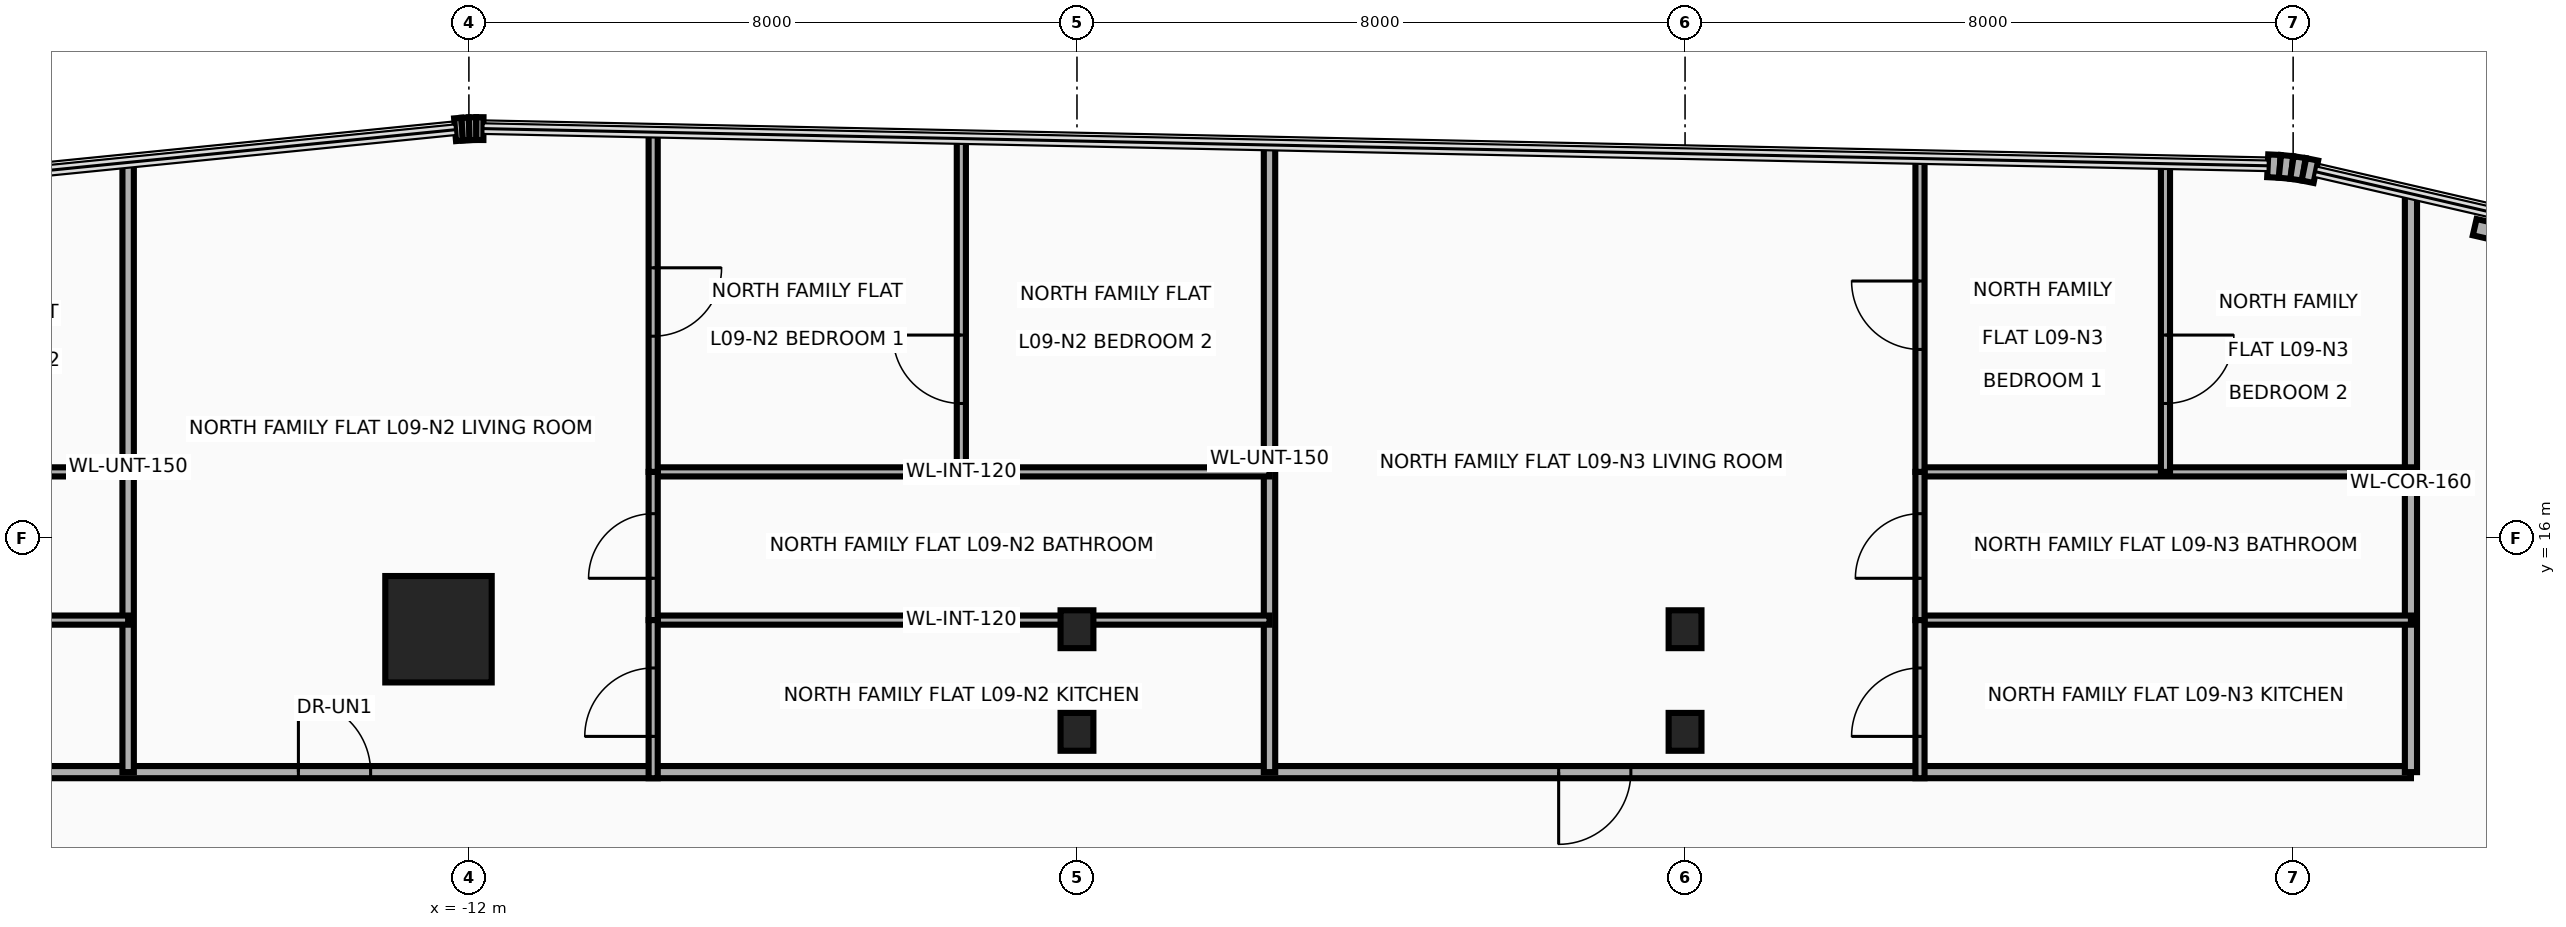
"""IFC4 building model, lengths in metres.
Left out: names, types, materials, properties, quantities, classifications, styles, units other than length and angle.
Written with IfcOpenShell. Run it as: python <this file> out.ifc"""

import sys

from ifc_helpers import new_model, si_unit, direction, frame, frame_2d, origin, origin_2d, place, context, subcontext, project, spatial, rectangle, i_section, extrude, source, transform, mapped, element, fill, save


model = new_model("IFC4")
c1 = context("Model", 3, precision=1e-05, world=origin(), true_north=direction((0.0, 1.0)))
c2 = subcontext(c1, "Body", "Model", "MODEL_VIEW")
j1 = project(units=[si_unit("LENGTHUNIT", "METRE"), si_unit("PLANEANGLEUNIT", "RADIAN")], contexts=[c1])
p1 = place(None, origin())
s1 = spatial("IfcSite", under=j1, at=p1, CompositionType="ELEMENT")
p2 = place(p1, origin())
s2 = spatial("IfcBuilding", under=s1, at=p2, CompositionType="ELEMENT")
p3 = place(p2, frame((0.0, 0.0, 40.8)))
s3 = spatial("IfcBuildingStorey", under=s2, at=p3, CompositionType="ELEMENT", Elevation=40.8)
m1 = source(origin(), c2, "Body", "SweptSolid", [
    extrude(rectangle(XDim=1.4, YDim=1.4, at=origin_2d()), origin(), (0.0, 0.0, 1.0), 3.7),
])
p4 = place(p3, frame((-12.4, 14.8, 0.0), z_axis=(0.0, 0.0, 1.0), x_axis=(1.0, 0.0, 0.0)))
e1 = element("IfcColumn", 1, at=p4, inside=s3, PredefinedType="COLUMN", context=c2, shape_type="MappedRepresentation", body=[
    mapped(m1, transform((0.0, 0.0, 0.0), x_axis=(1.0, 0.0, 0.0), y_axis=(0.0, 1.0, 0.0), z_axis=(0.0, 0.0, 1.0), scale=1.0)),
])
m2 = source(origin(), c2, "Body", "SweptSolid", [
    extrude(i_section(OverallWidth=0.432, OverallDepth=0.498, WebThickness=0.056, FlangeThickness=0.089, at=origin_2d()), origin(), (0.0, 0.0, 1.0), 3.7),
])
for number, where, z_axis, x_axis in (
    (2, (-4.0, 13.45, 0.0), (0.0, 0.0, 1.0), (1.0, 0.0, 0.0)),
    (3, (-4.0, 14.8, 0.0), (0.0, 0.0, 1.0), (1.0, 0.0, 0.0)),
    (4, (4.0, 13.45, 0.0), (0.0, 0.0, 1.0), (1.0, 0.0, 0.0)),
    (5, (4.0, 14.8, 0.0), (0.0, 0.0, 1.0), (1.0, 0.0, 0.0)),
):
    element("IfcColumn", number, at=place(p3, frame(where, z_axis=z_axis, x_axis=x_axis)), inside=s3, PredefinedType="COLUMN", context=c2, shape_type="MappedRepresentation", body=[
        mapped(m2, transform((0.0, 0.0, 0.0), x_axis=(1.0, 0.0, 0.0), y_axis=(0.0, 1.0, 0.0), z_axis=(0.0, 0.0, 1.0), scale=1.0)),
    ])
p5 = place(p3, frame((-12.182, 21.371, 0.0), z_axis=(0.0, 0.0, 1.0), x_axis=(0.996527790842, 0.08326080759, 0.0)))
e6 = element("IfcWall", 6, at=p5, inside=s3, PredefinedType="SOLIDWALL", context=c2, shape_type="SweptSolid", body=[
    extrude(rectangle(XDim=0.094, YDim=0.3, at=frame_2d((0.047, 0.0))), origin(), (0.0, 0.0, 1.0), 3.46),
])
p6 = place(p3, frame((-12.088, 21.379, 0.0), z_axis=(0.0, 0.0, 1.0), x_axis=(0.998476480444, 0.055178963393, 0.0)))
e7 = element("IfcWall", 7, at=p6, inside=s3, PredefinedType="SOLIDWALL", context=c2, shape_type="SweptSolid", body=[
    extrude(rectangle(XDim=0.093, YDim=0.3, at=frame_2d((0.046, 0.0))), origin(), (0.0, 0.0, 1.0), 3.46),
])
p7 = place(p3, frame((-11.996, 21.384, 0.0), z_axis=(0.0, 0.0, 1.0), x_axis=(0.999722573757, 0.023553673204, 0.0)))
e8 = element("IfcWall", 8, at=p7, inside=s3, PredefinedType="SOLIDWALL", context=c2, shape_type="SweptSolid", body=[
    extrude(rectangle(XDim=0.093, YDim=0.3, at=frame_2d((0.047, 0.0))), origin(), (0.0, 0.0, 1.0), 3.46),
])
p8 = place(p3, frame((-11.902, 21.386, 0.0), z_axis=(0.0, 0.0, 1.0), x_axis=(0.999986507273, -0.005194735103, 0.0)))
e9 = element("IfcWall", 9, at=p8, inside=s3, PredefinedType="SOLIDWALL", context=c2, shape_type="SweptSolid", body=[
    extrude(rectangle(XDim=0.094, YDim=0.3, at=frame_2d((0.047, 0.0))), origin(), (0.0, 0.0, 1.0), 3.46),
])
p9 = place(p3, frame((11.666, 20.897, 0.0), z_axis=(0.0, 0.0, 1.0), x_axis=(0.998885297239, -0.047203421059, 0.0)))
e10 = element("IfcWall", 10, at=p9, inside=s3, PredefinedType="SOLIDWALL", context=c2, shape_type="SweptSolid", body=[
    extrude(rectangle(XDim=0.16, YDim=0.3, at=frame_2d((0.08, 0.0))), origin(), (0.0, 0.0, 1.0), 3.46),
])
p10 = place(p3, frame((11.826, 20.889, 0.0), z_axis=(0.0, 0.0, 1.0), x_axis=(0.995172891136, -0.098137234257, 0.0)))
e11 = element("IfcWall", 11, at=p10, inside=s3, PredefinedType="SOLIDWALL", context=c2, shape_type="SweptSolid", body=[
    extrude(rectangle(XDim=0.159, YDim=0.3, at=frame_2d((0.08, 0.0))), origin(), (0.0, 0.0, 1.0), 3.46),
])
p11 = place(p3, frame((11.984, 20.874, 0.0), z_axis=(0.0, 0.0, 1.0), x_axis=(0.988846069207, -0.148941100486, 0.0)))
e12 = element("IfcWall", 12, at=p11, inside=s3, PredefinedType="SOLIDWALL", context=c2, shape_type="SweptSolid", body=[
    extrude(rectangle(XDim=0.159, YDim=0.3, at=frame_2d((0.08, 0.0))), origin(), (0.0, 0.0, 1.0), 3.46),
])
p12 = place(p3, frame((12.142, 20.85, 0.0), z_axis=(0.0, 0.0, 1.0), x_axis=(0.979991950448, -0.19903712482, 0.0)))
e13 = element("IfcWall", 13, at=p12, inside=s3, PredefinedType="SOLIDWALL", context=c2, shape_type="SweptSolid", body=[
    extrude(rectangle(XDim=0.161, YDim=0.3, at=frame_2d((0.08, 0.0))), origin(), (0.0, 0.0, 1.0), 3.46),
])
p13 = place(p3, frame((14.389, 20.09, 0.0), z_axis=(0.0, 0.0, 1.0), x_axis=(0.974400545997, -0.224818984875, 0.0)))
e14 = element("IfcWall", 14, at=p13, inside=s3, PredefinedType="SOLIDWALL", context=c2, shape_type="SweptSolid", body=[
    extrude(rectangle(XDim=2.2, YDim=0.22, at=frame_2d((1.1, 0.0))), origin(), (0.0, 0.0, 1.0), 3.46),
])
p14 = place(p13, frame((0.65, 0.0, 0.95)))
e15 = element("IfcOpeningElement", 15, at=p14, cuts=e14, PredefinedType="OPENING", context=c2, shape_type="SweptSolid", body=[
    extrude(rectangle(XDim=0.9, YDim=1.3, at=frame_2d((0.45, 0.65))), frame((0.0, 0.125, 0.0), z_axis=(0.0, -1.0, 0.0), x_axis=(1.0, 0.0, 0.0)), (0.0, 0.0, 1.0), 0.25),
])
p15 = place(p3, frame((-31.89, 12.92, 0.0), z_axis=(0.0, 0.0, 1.0), x_axis=(1.0, 0.0, 0.0)))
e16 = element("IfcWall", 16, at=p15, inside=s3, PredefinedType="PARTITIONING", context=c2, shape_type="SweptSolid", body=[
    extrude(rectangle(XDim=45.44, YDim=0.16, at=frame_2d((22.72, 0.0))), origin(), (0.0, 0.0, 1.0), 2.583),
])
p16 = place(p15, frame((3.069, 0.0, 0.0)))
e17 = element("IfcOpeningElement", 17, at=p16, cuts=e16, PredefinedType="OPENING", context=c2, shape_type="SweptSolid", body=[
    extrude(rectangle(XDim=0.95, YDim=2.15, at=frame_2d((0.475, 1.075))), frame((0.0, 0.095, 0.0), z_axis=(0.0, -1.0, 0.0), x_axis=(1.0, 0.0, 0.0)), (0.0, 0.0, 1.0), 0.19),
])
p17 = place(p15, frame((17.647, 0.0, 0.0)))
e18 = element("IfcOpeningElement", 18, at=p17, cuts=e16, PredefinedType="OPENING", context=c2, shape_type="SweptSolid", body=[
    extrude(rectangle(XDim=0.95, YDim=2.15, at=frame_2d((0.475, 1.075))), frame((0.0, 0.095, 0.0), z_axis=(0.0, -1.0, 0.0), x_axis=(1.0, 0.0, 0.0)), (0.0, 0.0, 1.0), 0.19),
])
p18 = place(p15, frame((34.227, 0.0, 0.0)))
e19 = element("IfcOpeningElement", 19, at=p18, cuts=e16, PredefinedType="OPENING", context=c2, shape_type="SweptSolid", body=[
    extrude(rectangle(XDim=0.95, YDim=2.15, at=frame_2d((0.475, 1.075))), frame((0.0, 0.095, 0.0), z_axis=(0.0, -1.0, 0.0), x_axis=(1.0, 0.0, 0.0)), (0.0, 0.0, 1.0), 0.19),
])
p19 = place(p3, frame((13.55, 12.92, 0.0), z_axis=(0.0, 0.0, 1.0), x_axis=(0.0, 1.0, 0.0)))
e20 = element("IfcWall", 20, at=p19, inside=s3, PredefinedType="PARTITIONING", context=c2, shape_type="SweptSolid", body=[
    extrude(rectangle(XDim=7.609, YDim=0.16, at=frame_2d((3.805, 0.0))), origin(), (0.0, 0.0, 1.0), 2.583),
])
p20 = place(p3, frame((-16.483, 12.92, 0.0), z_axis=(0.0, 0.0, 1.0), x_axis=(0.0, 1.0, 0.0)))
e21 = element("IfcWall", 21, at=p20, inside=s3, PredefinedType="PARTITIONING", context=c2, shape_type="SweptSolid", body=[
    extrude(rectangle(XDim=8.021, YDim=0.15, at=frame_2d((4.011, 0.0))), origin(), (0.0, 0.0, 1.0), 2.583),
])
p21 = place(p3, frame((-1.467, 12.92, 0.0), z_axis=(0.0, 0.0, 1.0), x_axis=(0.0, 1.0, 0.0)))
e22 = element("IfcWall", 22, at=p21, inside=s3, PredefinedType="PARTITIONING", context=c2, shape_type="SweptSolid", body=[
    extrude(rectangle(XDim=8.251, YDim=0.15, at=frame_2d((4.125, 0.0))), origin(), (0.0, 0.0, 1.0), 2.583),
])
p22 = place(p3, frame((-24.803, 14.92, 0.0), z_axis=(0.0, 0.0, 1.0), x_axis=(1.0, 0.0, 0.0)))
e23 = element("IfcWall", 23, at=p22, inside=s3, PredefinedType="PARTITIONING", context=c2, shape_type="SweptSolid", body=[
    extrude(rectangle(XDim=8.32, YDim=0.12, at=frame_2d((4.16, 0.0))), origin(), (0.0, 0.0, 1.0), 2.583),
])
p23 = place(p3, frame((-24.803, 16.87, 0.0), z_axis=(0.0, 0.0, 1.0), x_axis=(1.0, 0.0, 0.0)))
e24 = element("IfcWall", 24, at=p23, inside=s3, PredefinedType="PARTITIONING", context=c2, shape_type="SweptSolid", body=[
    extrude(rectangle(XDim=8.32, YDim=0.12, at=frame_2d((4.16, 0.0))), origin(), (0.0, 0.0, 1.0), 3.46),
])
p24 = place(p3, frame((-9.576, 14.92, 0.0), z_axis=(0.0, 0.0, 1.0), x_axis=(1.0, 0.0, 0.0)))
e25 = element("IfcWall", 25, at=p24, inside=s3, PredefinedType="PARTITIONING", context=c2, shape_type="SweptSolid", body=[
    extrude(rectangle(XDim=8.109, YDim=0.12, at=frame_2d((4.054, 0.0))), origin(), (0.0, 0.0, 1.0), 2.583),
])
p25 = place(p3, frame((-9.576, 16.87, 0.0), z_axis=(0.0, 0.0, 1.0), x_axis=(1.0, 0.0, 0.0)))
e26 = element("IfcWall", 26, at=p25, inside=s3, PredefinedType="PARTITIONING", context=c2, shape_type="SweptSolid", body=[
    extrude(rectangle(XDim=8.109, YDim=0.12, at=frame_2d((4.054, 0.0))), origin(), (0.0, 0.0, 1.0), 3.46),
])
p26 = place(p3, frame((-9.576, 14.92, 0.0), z_axis=(0.0, 0.0, 1.0), x_axis=(0.0, 1.0, 0.0)))
e27 = element("IfcWall", 27, at=p26, inside=s3, PredefinedType="PARTITIONING", context=c2, shape_type="SweptSolid", body=[
    extrude(rectangle(XDim=1.95, YDim=0.12, at=frame_2d((0.975, 0.0))), origin(), (0.0, 0.0, 1.0), 2.583),
])
p27 = place(p26, frame((0.55, 0.0, 0.0)))
e28 = element("IfcOpeningElement", 28, at=p27, cuts=e27, PredefinedType="OPENING", context=c2, shape_type="SweptSolid", body=[
    extrude(rectangle(XDim=0.85, YDim=2.1, at=frame_2d((0.425, 1.05))), frame((0.0, 0.075, 0.0), z_axis=(0.0, -1.0, 0.0), x_axis=(1.0, 0.0, 0.0)), (0.0, 0.0, 1.0), 0.15),
])
p28 = place(p3, frame((-9.576, 12.84, 0.0), z_axis=(0.0, 0.0, 1.0), x_axis=(0.0, 1.0, 0.0)))
e29 = element("IfcWall", 29, at=p28, inside=s3, PredefinedType="PARTITIONING", context=c2, shape_type="SweptSolid", body=[
    extrude(rectangle(XDim=2.08, YDim=0.12, at=frame_2d((1.04, 0.0))), origin(), (0.0, 0.0, 1.0), 2.583),
])
p29 = place(p28, frame((0.55, 0.0, 0.0)))
e30 = element("IfcOpeningElement", 30, at=p29, cuts=e29, PredefinedType="OPENING", context=c2, shape_type="SweptSolid", body=[
    extrude(rectangle(XDim=0.9, YDim=2.1, at=frame_2d((0.45, 1.05))), frame((0.0, 0.075, 0.0), z_axis=(0.0, -1.0, 0.0), x_axis=(1.0, 0.0, 0.0)), (0.0, 0.0, 1.0), 0.15),
])
p30 = place(p3, frame((-9.576, 16.87, 0.0), z_axis=(0.0, 0.0, 1.0), x_axis=(0.0, 1.0, 0.0)))
e31 = element("IfcWall", 31, at=p30, inside=s3, PredefinedType="PARTITIONING", context=c2, shape_type="SweptSolid", body=[
    extrude(rectangle(XDim=4.469, YDim=0.12, at=frame_2d((2.235, 0.0))), origin(), (0.0, 0.0, 1.0), 3.46),
])
p31 = place(p30, frame((1.785, 0.0, 0.0)))
e32 = element("IfcOpeningElement", 32, at=p31, cuts=e31, PredefinedType="OPENING", context=c2, shape_type="SweptSolid", body=[
    extrude(rectangle(XDim=0.9, YDim=2.1, at=frame_2d((0.45, 1.05))), frame((0.0, 0.075, 0.0), z_axis=(0.0, -1.0, 0.0), x_axis=(1.0, 0.0, 0.0)), (0.0, 0.0, 1.0), 0.15),
])
p32 = place(p3, frame((-5.521, 16.87, 0.0), z_axis=(0.0, 0.0, 1.0), x_axis=(0.0, 1.0, 0.0)))
e33 = element("IfcWall", 33, at=p32, inside=s3, PredefinedType="PARTITIONING", context=c2, shape_type="SweptSolid", body=[
    extrude(rectangle(XDim=4.385, YDim=0.12, at=frame_2d((2.192, 0.0))), origin(), (0.0, 0.0, 1.0), 3.46),
])
p33 = place(p32, frame((0.9, 0.0, 0.0)))
e34 = element("IfcOpeningElement", 34, at=p33, cuts=e33, PredefinedType="OPENING", context=c2, shape_type="SweptSolid", body=[
    extrude(rectangle(XDim=0.9, YDim=2.1, at=frame_2d((0.45, 1.05))), frame((0.0, 0.075, 0.0), z_axis=(0.0, -1.0, 0.0), x_axis=(1.0, 0.0, 0.0)), (0.0, 0.0, 1.0), 0.15),
])
for number, where, z_axis, x_axis in (
    (35, (7.091, 14.92, 0.0), (0.0, 0.0, 1.0), (1.0, 0.0, 0.0)),
    (36, (7.091, 16.87, 0.0), (0.0, 0.0, 1.0), (1.0, 0.0, 0.0)),
):
    element("IfcWall", number, at=place(p3, frame(where, z_axis=z_axis, x_axis=x_axis)), inside=s3, PredefinedType="PARTITIONING", context=c2, shape_type="SweptSolid", body=[
        extrude(rectangle(XDim=6.459, YDim=0.12, at=frame_2d((3.229, 0.0))), origin(), (0.0, 0.0, 1.0), 3.46),
    ])
p34 = place(p3, frame((7.091, 14.92, 0.0), z_axis=(0.0, 0.0, 1.0), x_axis=(0.0, 1.0, 0.0)))
e37 = element("IfcWall", 37, at=p34, inside=s3, PredefinedType="PARTITIONING", context=c2, shape_type="SweptSolid", body=[
    extrude(rectangle(XDim=1.95, YDim=0.12, at=frame_2d((0.975, 0.0))), origin(), (0.0, 0.0, 1.0), 3.46),
])
p35 = place(p34, frame((0.55, 0.0, 0.0)))
e38 = element("IfcOpeningElement", 38, at=p35, cuts=e37, PredefinedType="OPENING", context=c2, shape_type="SweptSolid", body=[
    extrude(rectangle(XDim=0.85, YDim=2.1, at=frame_2d((0.425, 1.05))), frame((0.0, 0.075, 0.0), z_axis=(0.0, -1.0, 0.0), x_axis=(1.0, 0.0, 0.0)), (0.0, 0.0, 1.0), 0.15),
])
p36 = place(p3, frame((7.091, 12.84, 0.0), z_axis=(0.0, 0.0, 1.0), x_axis=(0.0, 1.0, 0.0)))
e39 = element("IfcWall", 39, at=p36, inside=s3, PredefinedType="PARTITIONING", context=c2, shape_type="SweptSolid", body=[
    extrude(rectangle(XDim=2.08, YDim=0.12, at=frame_2d((1.04, 0.0))), origin(), (0.0, 0.0, 1.0), 2.583),
])
p37 = place(p36, frame((0.55, 0.0, 0.0)))
e40 = element("IfcOpeningElement", 40, at=p37, cuts=e39, PredefinedType="OPENING", context=c2, shape_type="SweptSolid", body=[
    extrude(rectangle(XDim=0.9, YDim=2.1, at=frame_2d((0.45, 1.05))), frame((0.0, 0.075, 0.0), z_axis=(0.0, -1.0, 0.0), x_axis=(1.0, 0.0, 0.0)), (0.0, 0.0, 1.0), 0.15),
])
p38 = place(p3, frame((7.091, 16.87, 0.0), z_axis=(0.0, 0.0, 1.0), x_axis=(0.0, 1.0, 0.0)))
e41 = element("IfcWall", 41, at=p38, inside=s3, PredefinedType="PARTITIONING", context=c2, shape_type="SweptSolid", body=[
    extrude(rectangle(XDim=4.122, YDim=0.12, at=frame_2d((2.061, 0.0))), origin(), (0.0, 0.0, 1.0), 3.46),
])
p39 = place(p38, frame((1.611, 0.0, 0.0)))
e42 = element("IfcOpeningElement", 42, at=p39, cuts=e41, PredefinedType="OPENING", context=c2, shape_type="SweptSolid", body=[
    extrude(rectangle(XDim=0.9, YDim=2.1, at=frame_2d((0.45, 1.05))), frame((0.0, 0.075, 0.0), z_axis=(0.0, -1.0, 0.0), x_axis=(1.0, 0.0, 0.0)), (0.0, 0.0, 1.0), 0.15),
])
p40 = place(p3, frame((10.32, 16.87, 0.0), z_axis=(0.0, 0.0, 1.0), x_axis=(0.0, 1.0, 0.0)))
e43 = element("IfcWall", 43, at=p40, inside=s3, PredefinedType="PARTITIONING", context=c2, shape_type="SweptSolid", body=[
    extrude(rectangle(XDim=4.055, YDim=0.12, at=frame_2d((2.027, 0.0))), origin(), (0.0, 0.0, 1.0), 3.46),
])
p41 = place(p40, frame((0.9, 0.0, 0.0)))
e44 = element("IfcOpeningElement", 44, at=p41, cuts=e43, PredefinedType="OPENING", context=c2, shape_type="SweptSolid", body=[
    extrude(rectangle(XDim=0.9, YDim=2.1, at=frame_2d((0.45, 1.05))), frame((0.0, 0.075, 0.0), z_axis=(0.0, -1.0, 0.0), x_axis=(1.0, 0.0, 0.0)), (0.0, 0.0, 1.0), 0.15),
])
p42 = place(p17, origin())
e45 = element("IfcDoor", 45, at=p42, inside=s3, OperationType="SINGLE_SWING_RIGHT", PredefinedType="DOOR", context=c2, shape_type="SweptSolid", body=[
    extrude(rectangle(XDim=0.95, YDim=2.15, at=frame_2d((0.475, 1.075))), frame((0.0, 0.025, 0.0), z_axis=(0.0, -1.0, 0.0), x_axis=(1.0, 0.0, 0.0)), (0.0, 0.0, 1.0), 0.05),
])
fill(e18, e45)
p43 = place(p27, origin())
e46 = element("IfcDoor", 46, at=p43, inside=s3, OperationType="SINGLE_SWING_LEFT", PredefinedType="DOOR", context=c2, shape_type="SweptSolid", body=[
    extrude(rectangle(XDim=0.85, YDim=2.1, at=frame_2d((0.425, 1.05))), frame((0.0, 0.025, 0.0), z_axis=(0.0, -1.0, 0.0), x_axis=(1.0, 0.0, 0.0)), (0.0, 0.0, 1.0), 0.05),
])
fill(e28, e46)
p44 = place(p29, origin())
e47 = element("IfcDoor", 47, at=p44, inside=s3, OperationType="SINGLE_SWING_RIGHT", PredefinedType="DOOR", context=c2, shape_type="SweptSolid", body=[
    extrude(rectangle(XDim=0.9, YDim=2.1, at=frame_2d((0.45, 1.05))), frame((0.0, 0.025, 0.0), z_axis=(0.0, -1.0, 0.0), x_axis=(1.0, 0.0, 0.0)), (0.0, 0.0, 1.0), 0.05),
])
fill(e30, e47)
p45 = place(p31, frame((0.9, 0.0, 0.0), z_axis=(0.0, 0.0, 1.0), x_axis=(-1.0, 0.0, 0.0)))
e48 = element("IfcDoor", 48, at=p45, inside=s3, OperationType="SINGLE_SWING_LEFT", PredefinedType="DOOR", context=c2, shape_type="SweptSolid", body=[
    extrude(rectangle(XDim=0.9, YDim=2.1, at=frame_2d((0.45, 1.05))), frame((0.0, 0.025, 0.0), z_axis=(0.0, -1.0, 0.0), x_axis=(1.0, 0.0, 0.0)), (0.0, 0.0, 1.0), 0.05),
])
fill(e32, e48)
p46 = place(p33, origin())
e49 = element("IfcDoor", 49, at=p46, inside=s3, OperationType="SINGLE_SWING_RIGHT", PredefinedType="DOOR", context=c2, shape_type="SweptSolid", body=[
    extrude(rectangle(XDim=0.9, YDim=2.1, at=frame_2d((0.45, 1.05))), frame((0.0, 0.025, 0.0), z_axis=(0.0, -1.0, 0.0), x_axis=(1.0, 0.0, 0.0)), (0.0, 0.0, 1.0), 0.05),
])
fill(e34, e49)
p47 = place(p18, frame((0.95, 0.0, 0.0), z_axis=(0.0, 0.0, 1.0), x_axis=(-1.0, 0.0, 0.0)))
e50 = element("IfcDoor", 50, at=p47, inside=s3, OperationType="SINGLE_SWING_LEFT", PredefinedType="DOOR", context=c2, shape_type="SweptSolid", body=[
    extrude(rectangle(XDim=0.95, YDim=2.15, at=frame_2d((0.475, 1.075))), frame((0.0, 0.025, 0.0), z_axis=(0.0, -1.0, 0.0), x_axis=(1.0, 0.0, 0.0)), (0.0, 0.0, 1.0), 0.05),
])
fill(e19, e50)
p48 = place(p35, origin())
e51 = element("IfcDoor", 51, at=p48, inside=s3, OperationType="SINGLE_SWING_RIGHT", PredefinedType="DOOR", context=c2, shape_type="SweptSolid", body=[
    extrude(rectangle(XDim=0.85, YDim=2.1, at=frame_2d((0.425, 1.05))), frame((0.0, 0.025, 0.0), z_axis=(0.0, -1.0, 0.0), x_axis=(1.0, 0.0, 0.0)), (0.0, 0.0, 1.0), 0.05),
])
fill(e38, e51)
p49 = place(p37, origin())
e52 = element("IfcDoor", 52, at=p49, inside=s3, OperationType="SINGLE_SWING_LEFT", PredefinedType="DOOR", context=c2, shape_type="SweptSolid", body=[
    extrude(rectangle(XDim=0.9, YDim=2.1, at=frame_2d((0.45, 1.05))), frame((0.0, 0.025, 0.0), z_axis=(0.0, -1.0, 0.0), x_axis=(1.0, 0.0, 0.0)), (0.0, 0.0, 1.0), 0.05),
])
fill(e40, e52)
p50 = place(p39, origin())
e53 = element("IfcDoor", 53, at=p50, inside=s3, OperationType="SINGLE_SWING_RIGHT", PredefinedType="DOOR", context=c2, shape_type="SweptSolid", body=[
    extrude(rectangle(XDim=0.9, YDim=2.1, at=frame_2d((0.45, 1.05))), frame((0.0, 0.025, 0.0), z_axis=(0.0, -1.0, 0.0), x_axis=(1.0, 0.0, 0.0)), (0.0, 0.0, 1.0), 0.05),
])
fill(e42, e53)
p51 = place(p41, frame((0.9, 0.0, 0.0), z_axis=(0.0, 0.0, 1.0), x_axis=(-1.0, 0.0, 0.0)))
e54 = element("IfcDoor", 54, at=p51, inside=s3, OperationType="SINGLE_SWING_LEFT", PredefinedType="DOOR", context=c2, shape_type="SweptSolid", body=[
    extrude(rectangle(XDim=0.9, YDim=2.1, at=frame_2d((0.45, 1.05))), frame((0.0, 0.025, 0.0), z_axis=(0.0, -1.0, 0.0), x_axis=(1.0, 0.0, 0.0)), (0.0, 0.0, 1.0), 0.05),
])
fill(e44, e54)
save(model, sys.argv[1])
